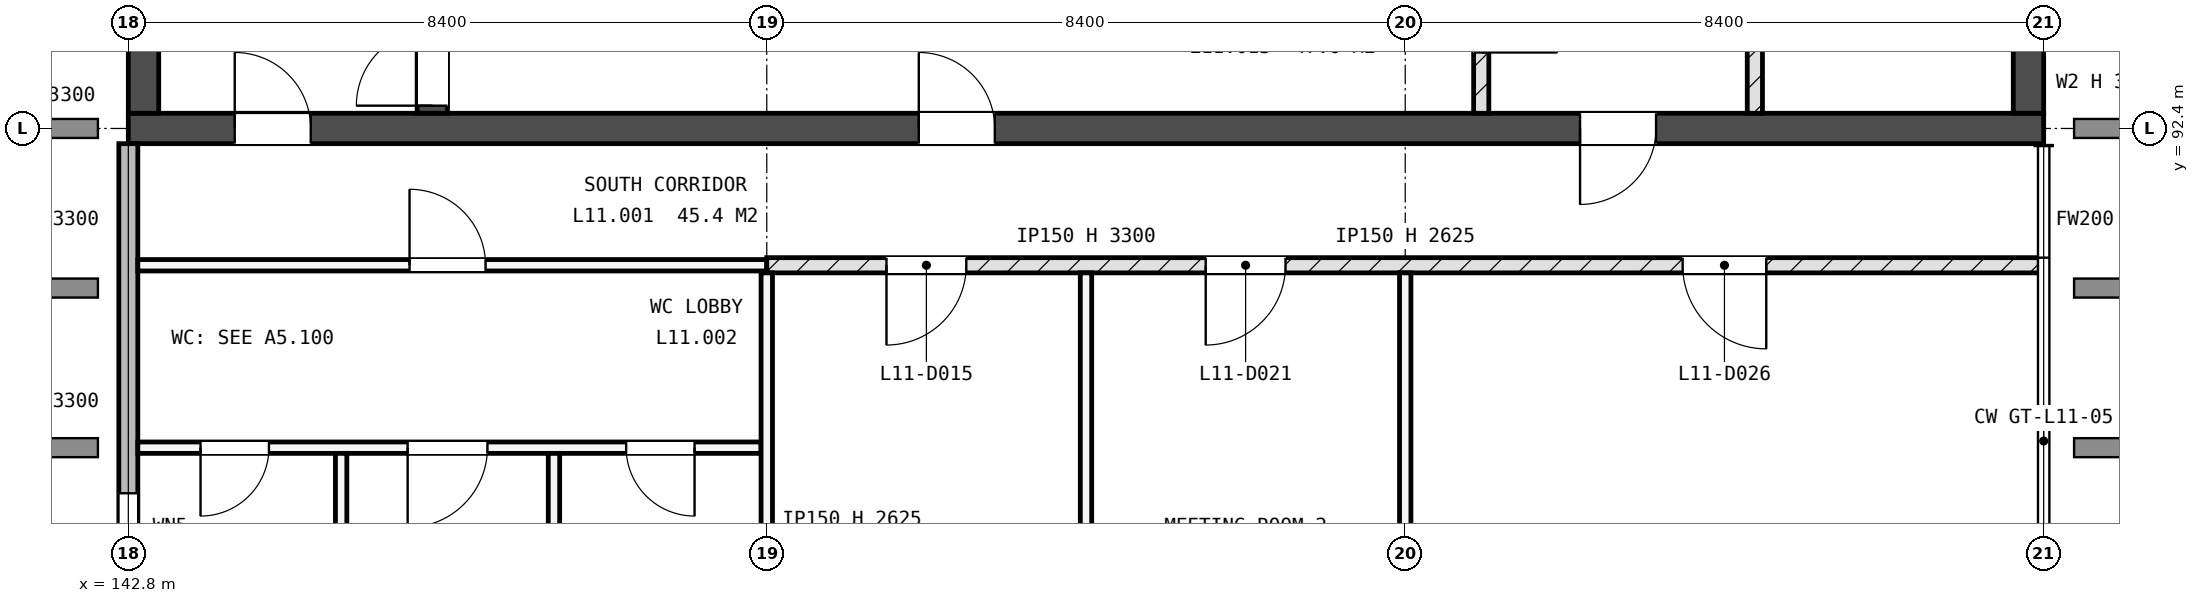
"""IFC4 building model, lengths in metres.
Left out: names, types, materials, properties, quantities, classifications, styles, units other than length and angle.
Written with IfcOpenShell. Run it as: python <this file> out.ifc"""

import sys

from ifc_helpers import new_model, si_unit, direction, frame, frame_2d, origin, place, context, subcontext, project, spatial, rectangle, extrude, element, fill, save


model = new_model("IFC4")
c1 = context("Model", 3, precision=1e-05, world=origin(), true_north=direction((0.0, 1.0)))
c2 = subcontext(c1, "Body", "Model", "MODEL_VIEW")
j1 = project(units=[si_unit("LENGTHUNIT", "METRE"), si_unit("PLANEANGLEUNIT", "RADIAN")], contexts=[c1])
p1 = place(None, origin())
s1 = spatial("IfcSite", under=j1, at=p1, CompositionType="ELEMENT")
p2 = place(p1, origin())
s2 = spatial("IfcBuilding", under=s1, at=p2, CompositionType="ELEMENT")
p3 = place(p2, frame((0.0, 0.0, 43.2)))
s3 = spatial("IfcBuildingStorey", under=s2, at=p3, CompositionType="ELEMENT", Elevation=43.2)
p4 = place(p3, frame((142.8, 92.4, -0.225), z_axis=(0.0, 0.0, 1.0), x_axis=(1.0, 0.0, 0.0)))
e1 = element("IfcWall", 1, at=p4, inside=s3, PredefinedType="SHEAR", context=c2, shape_type="SweptSolid", body=[
    extrude(rectangle(XDim=25.2, YDim=0.4, at=frame_2d((12.6, 0.0))), origin(), (0.0, 0.0, 1.0), 3.6),
])
p5 = place(p4, frame((1.4, 0.0, 0.225)))
e2 = element("IfcOpeningElement", 2, at=p5, cuts=e1, PredefinedType="OPENING", context=c2, shape_type="SweptSolid", body=[
    extrude(rectangle(XDim=1.0, YDim=2.1, at=frame_2d((0.5, 1.05))), frame((0.0, 0.21, 0.0), z_axis=(0.0, -1.0, 0.0), x_axis=(1.0, 0.0, 0.0)), (0.0, 0.0, 1.0), 0.42),
])
p6 = place(p4, frame((19.1, 0.0, 0.225)))
e3 = element("IfcOpeningElement", 3, at=p6, cuts=e1, PredefinedType="OPENING", context=c2, shape_type="SweptSolid", body=[
    extrude(rectangle(XDim=1.0, YDim=2.1, at=frame_2d((0.5, 1.05))), frame((0.0, 0.21, 0.0), z_axis=(0.0, -1.0, 0.0), x_axis=(1.0, 0.0, 0.0)), (0.0, 0.0, 1.0), 0.42),
])
p7 = place(p4, frame((10.4, 0.0, 0.225)))
e4 = element("IfcOpeningElement", 4, at=p7, cuts=e1, PredefinedType="OPENING", context=c2, shape_type="SweptSolid", body=[
    extrude(rectangle(XDim=1.0, YDim=2.1, at=frame_2d((0.5, 1.05))), frame((0.0, 0.21, 0.0), z_axis=(0.0, -1.0, 0.0), x_axis=(1.0, 0.0, 0.0)), (0.0, 0.0, 1.0), 0.42),
])
p8 = place(p3, frame((143.0, 92.6, -0.225), z_axis=(0.0, 0.0, 1.0), x_axis=(0.0, 1.0, 0.0)))
e5 = element("IfcWall", 5, at=p8, inside=s3, PredefinedType="SHEAR", context=c2, shape_type="SweptSolid", body=[
    extrude(rectangle(XDim=16.4, YDim=0.4, at=frame_2d((8.2, 0.0))), origin(), (0.0, 0.0, 1.0), 3.6),
])
p9 = place(p8, frame((3.0, 0.0, 1.825)))
e6 = element("IfcOpeningElement", 6, at=p9, cuts=e5, PredefinedType="OPENING", context=c2, shape_type="SweptSolid", body=[
    extrude(rectangle(XDim=1.2, YDim=0.9, at=frame_2d((0.6, 0.45))), frame((0.0, 0.21, 0.0), z_axis=(0.0, -1.0, 0.0), x_axis=(1.0, 0.0, 0.0)), (0.0, 0.0, 1.0), 0.42),
])
p10 = place(p3, frame((167.8, 92.6, -0.225), z_axis=(0.0, 0.0, 1.0), x_axis=(0.0, 1.0, 0.0)))
e7 = element("IfcWall", 7, at=p10, inside=s3, PredefinedType="SHEAR", context=c2, shape_type="SweptSolid", body=[
    extrude(rectangle(XDim=16.4, YDim=0.4, at=frame_2d((8.2, 0.0))), origin(), (0.0, 0.0, 1.0), 3.6),
])
p11 = place(p10, frame((12.2, 0.0, 1.825)))
e8 = element("IfcOpeningElement", 8, at=p11, cuts=e7, PredefinedType="OPENING", context=c2, shape_type="SweptSolid", body=[
    extrude(rectangle(XDim=1.2, YDim=0.9, at=frame_2d((0.6, 0.45))), frame((0.0, 0.21, 0.0), z_axis=(0.0, -1.0, 0.0), x_axis=(1.0, 0.0, 0.0)), (0.0, 0.0, 1.0), 0.42),
])
p12 = place(p3, frame((146.8, 92.6, -0.225), z_axis=(0.0, 0.0, 1.0), x_axis=(0.0, 1.0, 0.0)))
e9 = element("IfcWall", 9, at=p12, inside=s3, PredefinedType="SHEAR", context=c2, shape_type="SweptSolid", body=[
    extrude(rectangle(XDim=7.525, YDim=0.4, at=frame_2d((3.762, 0.0))), origin(), (0.0, 0.0, 1.0), 3.6),
])
p13 = place(p12, frame((0.1, 0.0, 0.225)))
e10 = element("IfcOpeningElement", 10, at=p13, cuts=e9, PredefinedType="OPENING", context=c2, shape_type="SweptSolid", body=[
    extrude(rectangle(XDim=1.0, YDim=2.1, at=frame_2d((0.5, 1.05))), frame((0.0, 0.21, 0.0), z_axis=(0.0, -1.0, 0.0), x_axis=(1.0, 0.0, 0.0)), (0.0, 0.0, 1.0), 0.42),
])
p14 = place(p3, frame((142.8, 84.4, 0.0), z_axis=(0.0, 0.0, 1.0), x_axis=(0.0, 1.0, 0.0)))
e11 = element("IfcWall", 11, at=p14, inside=s3, PredefinedType="STANDARD", context=c2, shape_type="SweptSolid", body=[
    extrude(rectangle(XDim=7.8, YDim=0.25, at=frame_2d((3.9, 0.0))), origin(), (0.0, 0.0, 1.0), 3.3),
])
p15 = place(p14, frame((2.3, 0.0, 2.1)))
e12 = element("IfcOpeningElement", 12, at=p15, cuts=e11, PredefinedType="OPENING", context=c2, shape_type="SweptSolid", body=[
    extrude(rectangle(XDim=0.9, YDim=0.6, at=frame_2d((0.45, 0.3))), frame((0.0, 0.135, 0.0), z_axis=(0.0, -1.0, 0.0), x_axis=(1.0, 0.0, 0.0)), (0.0, 0.0, 1.0), 0.27),
])
p16 = place(p3, frame((142.925, 88.2, 0.0), z_axis=(0.0, 0.0, 1.0), x_axis=(1.0, 0.0, 0.0)))
e13 = element("IfcWall", 13, at=p16, inside=s3, PredefinedType="PARTITIONING", context=c2, shape_type="SweptSolid", body=[
    extrude(rectangle(XDim=8.2, YDim=0.15, at=frame_2d((4.1, 0.0))), origin(), (0.0, 0.0, 1.0), 3.3),
])
p17 = place(p16, frame((0.825, 0.0, 0.0)))
e14 = element("IfcOpeningElement", 14, at=p17, cuts=e13, PredefinedType="OPENING", context=c2, shape_type="SweptSolid", body=[
    extrude(rectangle(XDim=0.9, YDim=2.1, at=frame_2d((0.45, 1.05))), frame((0.0, 0.085, 0.0), z_axis=(0.0, -1.0, 0.0), x_axis=(1.0, 0.0, 0.0)), (0.0, 0.0, 1.0), 0.17),
])
p18 = place(p16, frame((3.55, 0.0, 0.0)))
e15 = element("IfcOpeningElement", 15, at=p18, cuts=e13, PredefinedType="OPENING", context=c2, shape_type="SweptSolid", body=[
    extrude(rectangle(XDim=1.05, YDim=2.25, at=frame_2d((0.525, 1.125))), frame((0.0, 0.085, 0.0), z_axis=(0.0, -1.0, 0.0), x_axis=(1.0, 0.0, 0.0)), (0.0, 0.0, 1.0), 0.17),
])
p19 = place(p16, frame((6.425, 0.0, 0.0)))
e16 = element("IfcOpeningElement", 16, at=p19, cuts=e13, PredefinedType="OPENING", context=c2, shape_type="SweptSolid", body=[
    extrude(rectangle(XDim=0.9, YDim=2.1, at=frame_2d((0.45, 1.05))), frame((0.0, 0.085, 0.0), z_axis=(0.0, -1.0, 0.0), x_axis=(1.0, 0.0, 0.0)), (0.0, 0.0, 1.0), 0.17),
])
p20 = place(p3, frame((142.925, 90.6, 0.0), z_axis=(0.0, 0.0, 1.0), x_axis=(1.0, 0.0, 0.0)))
e17 = element("IfcWall", 17, at=p20, inside=s3, PredefinedType="PARTITIONING", context=c2, shape_type="SweptSolid", body=[
    extrude(rectangle(XDim=8.275, YDim=0.15, at=frame_2d((4.137, 0.0))), origin(), (0.0, 0.0, 1.0), 3.3),
])
p21 = place(p20, frame((3.575, 0.0, 0.0)))
e18 = element("IfcOpeningElement", 18, at=p21, cuts=e17, PredefinedType="OPENING", context=c2, shape_type="SweptSolid", body=[
    extrude(rectangle(XDim=1.0, YDim=2.1, at=frame_2d((0.5, 1.05))), frame((0.0, 0.085, 0.0), z_axis=(0.0, -1.0, 0.0), x_axis=(1.0, 0.0, 0.0)), (0.0, 0.0, 1.0), 0.17),
])
p22 = place(p3, frame((151.2, 90.6, 0.0), z_axis=(0.0, 0.0, 1.0), x_axis=(1.0, 0.0, 0.0)))
e19 = element("IfcWall", 19, at=p22, inside=s3, PredefinedType="SOLIDWALL", context=c2, shape_type="SweptSolid", body=[
    extrude(rectangle(XDim=16.8, YDim=0.2, at=frame_2d((8.4, 0.0))), origin(), (0.0, 0.0, 1.0), 3.3),
])
p23 = place(p22, frame((1.575, 0.0, 0.0)))
e20 = element("IfcOpeningElement", 20, at=p23, cuts=e19, PredefinedType="OPENING", context=c2, shape_type="SweptSolid", body=[
    extrude(rectangle(XDim=1.05, YDim=2.1, at=frame_2d((0.525, 1.05))), frame((0.0, 0.11, 0.0), z_axis=(0.0, -1.0, 0.0), x_axis=(1.0, 0.0, 0.0)), (0.0, 0.0, 1.0), 0.22),
])
p24 = place(p22, frame((5.775, 0.0, 0.0)))
e21 = element("IfcOpeningElement", 21, at=p24, cuts=e19, PredefinedType="OPENING", context=c2, shape_type="SweptSolid", body=[
    extrude(rectangle(XDim=1.05, YDim=2.1, at=frame_2d((0.525, 1.05))), frame((0.0, 0.11, 0.0), z_axis=(0.0, -1.0, 0.0), x_axis=(1.0, 0.0, 0.0)), (0.0, 0.0, 1.0), 0.22),
])
p25 = place(p22, frame((12.05, 0.0, 0.0)))
e22 = element("IfcOpeningElement", 22, at=p25, cuts=e19, PredefinedType="OPENING", context=c2, shape_type="SweptSolid", body=[
    extrude(rectangle(XDim=1.1, YDim=2.25, at=frame_2d((0.55, 1.125))), frame((0.0, 0.11, 0.0), z_axis=(0.0, -1.0, 0.0), x_axis=(1.0, 0.0, 0.0)), (0.0, 0.0, 1.0), 0.22),
])
for number, where, z_axis, x_axis in (
    (23, (145.6, 84.125, 0.0), (0.0, 0.0, 1.0), (0.0, 1.0, 0.0)),
    (24, (148.4, 84.125, 0.0), (0.0, 0.0, 1.0), (0.0, 1.0, 0.0)),
):
    element("IfcWall", number, at=place(p3, frame(where, z_axis=z_axis, x_axis=x_axis)), inside=s3, PredefinedType="PARTITIONING", context=c2, shape_type="SweptSolid", body=[
        extrude(rectangle(XDim=4.0, YDim=0.15, at=frame_2d((2.0, 0.0))), origin(), (0.0, 0.0, 1.0), 3.3),
    ])
p26 = place(p3, frame((151.2, 84.0, 0.0), z_axis=(0.0, 0.0, 1.0), x_axis=(0.0, 1.0, 0.0)))
e25 = element("IfcWall", 25, at=p26, inside=s3, PredefinedType="PARTITIONING", context=c2, shape_type="SweptSolid", body=[
    extrude(rectangle(XDim=6.5, YDim=0.15, at=frame_2d((3.25, 0.0))), origin(), (0.0, 0.0, 1.0), 2.625),
])
p27 = place(p3, frame((155.4, 84.0, 0.0), z_axis=(0.0, 0.0, 1.0), x_axis=(0.0, 1.0, 0.0)))
e26 = element("IfcWall", 26, at=p27, inside=s3, PredefinedType="PARTITIONING", context=c2, shape_type="SweptSolid", body=[
    extrude(rectangle(XDim=6.5, YDim=0.15, at=frame_2d((3.25, 0.0))), origin(), (0.0, 0.0, 1.0), 3.3),
])
p28 = place(p3, frame((159.6, 84.0, 0.0), z_axis=(0.0, 0.0, 1.0), x_axis=(0.0, 1.0, 0.0)))
e27 = element("IfcWall", 27, at=p28, inside=s3, PredefinedType="PARTITIONING", context=c2, shape_type="SweptSolid", body=[
    extrude(rectangle(XDim=6.5, YDim=0.15, at=frame_2d((3.25, 0.0))), origin(), (0.0, 0.0, 1.0), 2.625),
])
p29 = place(p3, frame((160.6, 92.6, 0.0), z_axis=(0.0, 0.0, 1.0), x_axis=(0.0, 1.0, 0.0)))
e28 = element("IfcWall", 28, at=p29, inside=s3, PredefinedType="SOLIDWALL", context=c2, shape_type="SweptSolid", body=[
    extrude(rectangle(XDim=12.5, YDim=0.2, at=frame_2d((6.25, 0.0))), origin(), (0.0, 0.0, 1.0), 3.3),
])
p30 = place(p29, frame((5.1, 0.0, 0.0)))
e29 = element("IfcOpeningElement", 29, at=p30, cuts=e28, PredefinedType="OPENING", context=c2, shape_type="SweptSolid", body=[
    extrude(rectangle(XDim=0.8, YDim=2.1, at=frame_2d((0.4, 1.05))), frame((0.0, 0.11, 0.0), z_axis=(0.0, -1.0, 0.0), x_axis=(1.0, 0.0, 0.0)), (0.0, 0.0, 1.0), 0.22),
])
p31 = place(p29, frame((0.8, 0.0, 0.0)))
e30 = element("IfcOpeningElement", 30, at=p31, cuts=e28, PredefinedType="OPENING", context=c2, shape_type="SweptSolid", body=[
    extrude(rectangle(XDim=1.0, YDim=2.1, at=frame_2d((0.5, 1.05))), frame((0.0, 0.11, 0.0), z_axis=(0.0, -1.0, 0.0), x_axis=(1.0, 0.0, 0.0)), (0.0, 0.0, 1.0), 0.22),
])
p32 = place(p3, frame((164.2, 92.6, 0.0), z_axis=(0.0, 0.0, 1.0), x_axis=(0.0, 1.0, 0.0)))
e31 = element("IfcWall", 31, at=p32, inside=s3, PredefinedType="SOLIDWALL", context=c2, shape_type="SweptSolid", body=[
    extrude(rectangle(XDim=8.75, YDim=0.2, at=frame_2d((4.375, 0.0))), origin(), (0.0, 0.0, 1.0), 3.3),
])
p33 = place(p32, frame((1.7, 0.0, 0.0)))
e32 = element("IfcOpeningElement", 32, at=p33, cuts=e31, PredefinedType="OPENING", context=c2, shape_type="SweptSolid", body=[
    extrude(rectangle(XDim=0.8, YDim=2.1, at=frame_2d((0.4, 1.05))), frame((0.0, 0.11, 0.0), z_axis=(0.0, -1.0, 0.0), x_axis=(1.0, 0.0, 0.0)), (0.0, 0.0, 1.0), 0.22),
])
p34 = place(p32, frame((6.3, 0.0, 0.0)))
e33 = element("IfcOpeningElement", 33, at=p34, cuts=e31, PredefinedType="OPENING", context=c2, shape_type="SweptSolid", body=[
    extrude(rectangle(XDim=0.8, YDim=2.1, at=frame_2d((0.4, 1.05))), frame((0.0, 0.11, 0.0), z_axis=(0.0, -1.0, 0.0), x_axis=(1.0, 0.0, 0.0)), (0.0, 0.0, 1.0), 0.22),
])
p35 = place(p15, origin())
e34 = element("IfcWindow", 34, at=p35, inside=s3, PartitioningType="SINGLE_PANEL", PredefinedType="WINDOW", context=c2, shape_type="SweptSolid", body=[
    extrude(rectangle(XDim=0.9, YDim=0.6, at=frame_2d((0.45, 0.3))), frame((0.0, 0.03, 0.0), z_axis=(0.0, -1.0, 0.0), x_axis=(1.0, 0.0, 0.0)), (0.0, 0.0, 1.0), 0.06),
])
fill(e12, e34)
p36 = place(p5, origin())
e35 = element("IfcDoor", 35, at=p36, inside=s3, OperationType="SINGLE_SWING_RIGHT", PredefinedType="DOOR", context=c2, shape_type="SweptSolid", body=[
    extrude(rectangle(XDim=1.0, YDim=2.1, at=frame_2d((0.5, 1.05))), frame((0.0, 0.025, 0.0), z_axis=(0.0, -1.0, 0.0), x_axis=(1.0, 0.0, 0.0)), (0.0, 0.0, 1.0), 0.05),
])
fill(e2, e35)
p37 = place(p13, origin())
e36 = element("IfcDoor", 36, at=p37, inside=s3, OperationType="SINGLE_SWING_RIGHT", PredefinedType="DOOR", context=c2, shape_type="SweptSolid", body=[
    extrude(rectangle(XDim=1.0, YDim=2.1, at=frame_2d((0.5, 1.05))), frame((0.0, 0.025, 0.0), z_axis=(0.0, -1.0, 0.0), x_axis=(1.0, 0.0, 0.0)), (0.0, 0.0, 1.0), 0.05),
])
fill(e10, e36)
p38 = place(p17, origin())
e37 = element("IfcDoor", 37, at=p38, inside=s3, OperationType="SINGLE_SWING_LEFT", PredefinedType="DOOR", context=c2, shape_type="SweptSolid", body=[
    extrude(rectangle(XDim=0.9, YDim=2.1, at=frame_2d((0.45, 1.05))), frame((0.0, 0.025, 0.0), z_axis=(0.0, -1.0, 0.0), x_axis=(1.0, 0.0, 0.0)), (0.0, 0.0, 1.0), 0.05),
])
fill(e14, e37)
p39 = place(p18, origin())
e38 = element("IfcDoor", 38, at=p39, inside=s3, OperationType="SINGLE_SWING_LEFT", PredefinedType="DOOR", context=c2, shape_type="SweptSolid", body=[
    extrude(rectangle(XDim=1.05, YDim=2.25, at=frame_2d((0.525, 1.125))), frame((0.0, 0.025, 0.0), z_axis=(0.0, -1.0, 0.0), x_axis=(1.0, 0.0, 0.0)), (0.0, 0.0, 1.0), 0.05),
])
fill(e15, e38)
p40 = place(p19, origin())
e39 = element("IfcDoor", 39, at=p40, inside=s3, OperationType="SINGLE_SWING_RIGHT", PredefinedType="DOOR", context=c2, shape_type="SweptSolid", body=[
    extrude(rectangle(XDim=0.9, YDim=2.1, at=frame_2d((0.45, 1.05))), frame((0.0, 0.025, 0.0), z_axis=(0.0, -1.0, 0.0), x_axis=(1.0, 0.0, 0.0)), (0.0, 0.0, 1.0), 0.05),
])
fill(e16, e39)
p41 = place(p23, origin())
e40 = element("IfcDoor", 40, at=p41, inside=s3, OperationType="SINGLE_SWING_LEFT", PredefinedType="DOOR", context=c2, shape_type="SweptSolid", body=[
    extrude(rectangle(XDim=1.05, YDim=2.1, at=frame_2d((0.525, 1.05))), frame((0.0, 0.025, 0.0), z_axis=(0.0, -1.0, 0.0), x_axis=(1.0, 0.0, 0.0)), (0.0, 0.0, 1.0), 0.05),
])
fill(e20, e40)
p42 = place(p24, origin())
e41 = element("IfcDoor", 41, at=p42, inside=s3, OperationType="SINGLE_SWING_LEFT", PredefinedType="DOOR", context=c2, shape_type="SweptSolid", body=[
    extrude(rectangle(XDim=1.05, YDim=2.1, at=frame_2d((0.525, 1.05))), frame((0.0, 0.025, 0.0), z_axis=(0.0, -1.0, 0.0), x_axis=(1.0, 0.0, 0.0)), (0.0, 0.0, 1.0), 0.05),
])
fill(e21, e41)
p43 = place(p25, origin())
e42 = element("IfcDoor", 42, at=p43, inside=s3, OperationType="SINGLE_SWING_RIGHT", PredefinedType="DOOR", context=c2, shape_type="SweptSolid", body=[
    extrude(rectangle(XDim=1.1, YDim=2.25, at=frame_2d((0.55, 1.125))), frame((0.0, 0.025, 0.0), z_axis=(0.0, -1.0, 0.0), x_axis=(1.0, 0.0, 0.0)), (0.0, 0.0, 1.0), 0.05),
])
fill(e22, e42)
p44 = place(p21, origin())
e43 = element("IfcDoor", 43, at=p44, inside=s3, OperationType="SINGLE_SWING_RIGHT", PredefinedType="DOOR", context=c2, shape_type="SweptSolid", body=[
    extrude(rectangle(XDim=1.0, YDim=2.1, at=frame_2d((0.5, 1.05))), frame((0.0, 0.025, 0.0), z_axis=(0.0, -1.0, 0.0), x_axis=(1.0, 0.0, 0.0)), (0.0, 0.0, 1.0), 0.05),
])
fill(e18, e43)
p45 = place(p6, origin())
e44 = element("IfcDoor", 44, at=p45, inside=s3, OperationType="SINGLE_SWING_LEFT", PredefinedType="DOOR", context=c2, shape_type="SweptSolid", body=[
    extrude(rectangle(XDim=1.0, YDim=2.1, at=frame_2d((0.5, 1.05))), frame((0.0, 0.025, 0.0), z_axis=(0.0, -1.0, 0.0), x_axis=(1.0, 0.0, 0.0)), (0.0, 0.0, 1.0), 0.05),
])
fill(e3, e44)
p46 = place(p7, origin())
e45 = element("IfcDoor", 45, at=p46, inside=s3, OperationType="SINGLE_SWING_RIGHT", PredefinedType="DOOR", context=c2, shape_type="SweptSolid", body=[
    extrude(rectangle(XDim=1.0, YDim=2.1, at=frame_2d((0.5, 1.05))), frame((0.0, 0.025, 0.0), z_axis=(0.0, -1.0, 0.0), x_axis=(1.0, 0.0, 0.0)), (0.0, 0.0, 1.0), 0.05),
])
fill(e4, e45)
save(model, sys.argv[1])
